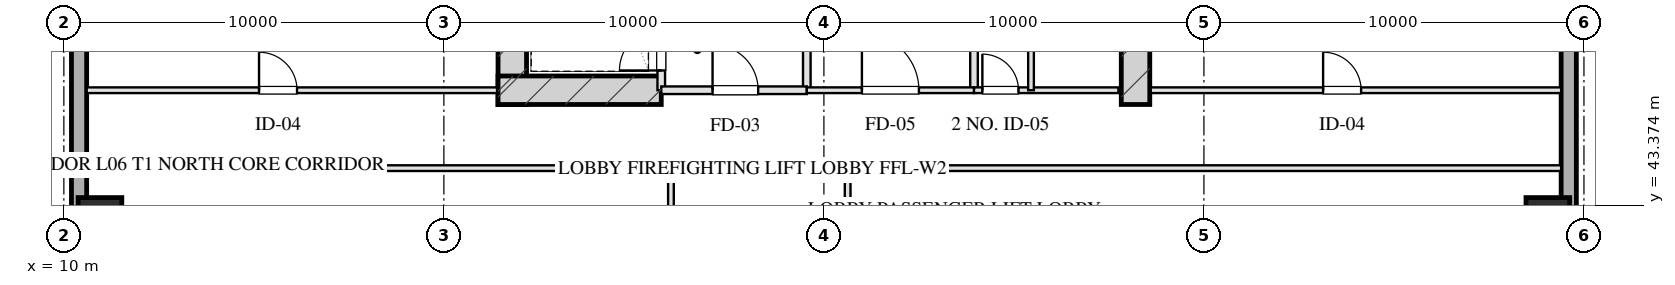
"""IFC4 building model, lengths in metres.
Left out: names, types, materials, properties, quantities, classifications, styles, units other than length and angle.
Written with IfcOpenShell. Run it as: python <this file> out.ifc"""

import sys

from ifc_helpers import new_model, si_unit, direction, frame, frame_2d, origin, origin_2d, place, context, subcontext, project, spatial, rectangle, hollow_rectangle, extrude, element, fill, save


model = new_model("IFC4")
c1 = context("Model", 3, precision=1e-05, world=origin(), true_north=direction((0.0, 1.0)))
c2 = subcontext(c1, "Body", "Model", "MODEL_VIEW")
j1 = project(units=[si_unit("LENGTHUNIT", "METRE"), si_unit("PLANEANGLEUNIT", "RADIAN")], contexts=[c1])
p1 = place(None, origin())
s1 = spatial("IfcSite", under=j1, at=p1, CompositionType="ELEMENT")
p2 = place(p1, origin())
s2 = spatial("IfcBuilding", under=s1, at=p2, CompositionType="ELEMENT")
p3 = place(p2, frame((0.0, 0.0, 30.0)))
s3 = spatial("IfcBuildingStorey", under=s2, at=p3, CompositionType="ELEMENT", Elevation=30.0)
for number, where, z_axis, x_axis in (
    (1, (21.8, 46.025, 0.0), (0.0, 0.0, 1.0), (0.0, 1.0, 0.0)),
    (2, (38.2, 46.025, 0.0), (0.0, 0.0, 1.0), (0.0, 1.0, 0.0)),
):
    element("IfcWall", number, at=place(p3, frame(where, z_axis=z_axis, x_axis=x_axis)), inside=s3, PredefinedType="SHEAR", context=c2, shape_type="SweptSolid", body=[
        extrude(rectangle(XDim=9.63, YDim=0.75, at=frame_2d((4.815, 0.0))), origin(), (0.0, 0.0, 1.0), 4.0),
    ])
p4 = place(p3, frame((21.425, 46.4, 0.0), z_axis=(0.0, 0.0, 1.0), x_axis=(1.0, 0.0, 0.0)))
e3 = element("IfcWall", 3, at=p4, inside=s3, PredefinedType="SHEAR", context=c2, shape_type="SweptSolid", body=[
    extrude(rectangle(XDim=4.295, YDim=0.75, at=frame_2d((2.147, 0.0))), origin(), (0.0, 0.0, 1.0), 4.0),
])
for number, where, z_axis, x_axis in (
    (4, (10.95, 43.0, 0.0), (0.0, 0.0, 1.0), (1.0, 0.0, 0.0)),
    (5, (49.05, 43.0, 0.0), (0.0, 0.0, 1.0), (1.0, 0.0, 0.0)),
):
    element("IfcColumn", number, at=place(p3, frame(where, z_axis=z_axis, x_axis=x_axis)), inside=s3, PredefinedType="COLUMN", context=c2, shape_type="SweptSolid", body=[
        extrude(hollow_rectangle(XDim=1.15, YDim=1.15, WallThickness=0.04, at=origin_2d()), origin(), (0.0, 0.0, 1.0), 4.001),
    ])
p5 = place(p3, frame((10.4, 7.2, 0.0), z_axis=(0.0, 0.0, 1.0), x_axis=(0.0, 1.0, 0.0)))
e6 = element("IfcWall", 6, at=p5, inside=s3, PredefinedType="SOLIDWALL", context=c2, shape_type="SweptSolid", body=[
    extrude(rectangle(XDim=53.6, YDim=0.4, at=frame_2d((26.8, 0.0))), origin(), (0.0, 0.0, 1.0), 3.16),
])
p6 = place(p5, frame((22.95, 0.0, 0.75)))
e7 = element("IfcOpeningElement", 7, at=p6, cuts=e6, PredefinedType="OPENING", context=c2, shape_type="SweptSolid", body=[
    extrude(rectangle(XDim=2.5, YDim=1.75, at=frame_2d((1.25, 0.875))), frame((0.0, 0.21, 0.0), z_axis=(0.0, -1.0, 0.0), x_axis=(1.0, 0.0, 0.0)), (0.0, 0.0, 1.0), 0.42),
])
p7 = place(p5, frame((28.15, 0.0, 0.75)))
e8 = element("IfcOpeningElement", 8, at=p7, cuts=e6, PredefinedType="OPENING", context=c2, shape_type="SweptSolid", body=[
    extrude(rectangle(XDim=2.5, YDim=1.75, at=frame_2d((1.25, 0.875))), frame((0.0, 0.21, 0.0), z_axis=(0.0, -1.0, 0.0), x_axis=(1.0, 0.0, 0.0)), (0.0, 0.0, 1.0), 0.42),
])
p8 = place(p3, frame((49.6, 60.8, 0.0), z_axis=(0.0, 0.0, 1.0), x_axis=(0.0, -1.0, 0.0)))
e9 = element("IfcWall", 9, at=p8, inside=s3, PredefinedType="SOLIDWALL", context=c2, shape_type="SweptSolid", body=[
    extrude(rectangle(XDim=53.6, YDim=0.4, at=frame_2d((26.8, 0.0))), origin(), (0.0, 0.0, 1.0), 3.16),
])
p9 = place(p8, frame((28.15, 0.0, 0.75)))
e10 = element("IfcOpeningElement", 10, at=p9, cuts=e9, PredefinedType="OPENING", context=c2, shape_type="SweptSolid", body=[
    extrude(rectangle(XDim=2.5, YDim=1.75, at=frame_2d((1.25, 0.875))), frame((0.0, 0.21, 0.0), z_axis=(0.0, -1.0, 0.0), x_axis=(1.0, 0.0, 0.0)), (0.0, 0.0, 1.0), 0.42),
])
p10 = place(p8, frame((22.95, 0.0, 0.75)))
e11 = element("IfcOpeningElement", 11, at=p10, cuts=e9, PredefinedType="OPENING", context=c2, shape_type="SweptSolid", body=[
    extrude(rectangle(XDim=2.5, YDim=1.75, at=frame_2d((1.25, 0.875))), frame((0.0, 0.21, 0.0), z_axis=(0.0, -1.0, 0.0), x_axis=(1.0, 0.0, 0.0)), (0.0, 0.0, 1.0), 0.42),
])
p11 = place(p3, frame((25.72, 46.4, 0.0), z_axis=(0.0, 0.0, 1.0), x_axis=(0.0, 1.0, 0.0)))
e12 = element("IfcWall", 12, at=p11, inside=s3, PredefinedType="PARTITIONING", context=c2, shape_type="SweptSolid", body=[
    extrude(rectangle(XDim=1.9, YDim=0.2, at=frame_2d((0.95, 0.0))), origin(), (0.0, 0.0, 1.0), 3.725),
])
p12 = place(p11, frame((0.52, 0.0, 0.0)))
e13 = element("IfcOpeningElement", 13, at=p12, cuts=e12, PredefinedType="OPENING", context=c2, shape_type="SweptSolid", body=[
    extrude(rectangle(XDim=1.1, YDim=2.05, at=frame_2d((0.55, 1.025))), frame((0.0, 0.11, 0.0), z_axis=(0.0, -1.0, 0.0), x_axis=(1.0, 0.0, 0.0)), (0.0, 0.0, 1.0), 0.22),
])
p13 = place(p3, frame((29.55, 46.4, 0.0), z_axis=(0.0, 0.0, 1.0), x_axis=(0.0, 1.0, 0.0)))
e14 = element("IfcWall", 14, at=p13, inside=s3, PredefinedType="PARTITIONING", context=c2, shape_type="SweptSolid", body=[
    extrude(rectangle(XDim=8.43, YDim=0.2, at=frame_2d((4.215, 0.0))), origin(), (0.0, 0.0, 1.0), 3.725),
])
p14 = place(p3, frame((25.72, 46.4, 0.0), z_axis=(0.0, 0.0, 1.0), x_axis=(1.0, 0.0, 0.0)))
e15 = element("IfcWall", 15, at=p14, inside=s3, PredefinedType="PARTITIONING", context=c2, shape_type="SweptSolid", body=[
    extrude(rectangle(XDim=3.83, YDim=0.2, at=frame_2d((1.915, 0.0))), origin(), (0.0, 0.0, 1.0), 3.725),
])
p15 = place(p14, frame((1.35, 0.0, 0.0)))
e16 = element("IfcOpeningElement", 16, at=p15, cuts=e15, PredefinedType="OPENING", context=c2, shape_type="SweptSolid", body=[
    extrude(rectangle(XDim=1.2, YDim=2.05, at=frame_2d((0.6, 1.025))), frame((0.0, 0.11, 0.0), z_axis=(0.0, -1.0, 0.0), x_axis=(1.0, 0.0, 0.0)), (0.0, 0.0, 1.0), 0.22),
])
p16 = place(p3, frame((33.95, 46.4, 0.0), z_axis=(0.0, 0.0, 1.0), x_axis=(0.0, 1.0, 0.0)))
e17 = element("IfcWall", 17, at=p16, inside=s3, PredefinedType="PARTITIONING", context=c2, shape_type="SweptSolid", body=[
    extrude(rectangle(XDim=8.43, YDim=0.2, at=frame_2d((4.215, 0.0))), origin(), (0.0, 0.0, 1.0), 3.725),
])
p17 = place(p3, frame((29.55, 46.4, 0.0), z_axis=(0.0, 0.0, 1.0), x_axis=(1.0, 0.0, 0.0)))
e18 = element("IfcWall", 18, at=p17, inside=s3, PredefinedType="PARTITIONING", context=c2, shape_type="SweptSolid", body=[
    extrude(rectangle(XDim=4.4, YDim=0.15, at=frame_2d((2.2, 0.0))), origin(), (0.0, 0.0, 1.0), 3.725),
])
p18 = place(p17, frame((1.45, 0.0, 0.0)))
e19 = element("IfcOpeningElement", 19, at=p18, cuts=e18, PredefinedType="OPENING", context=c2, shape_type="SweptSolid", body=[
    extrude(rectangle(XDim=1.5, YDim=2.05, at=frame_2d((0.75, 1.025))), frame((0.0, 0.085, 0.0), z_axis=(0.0, -1.0, 0.0), x_axis=(1.0, 0.0, 0.0)), (0.0, 0.0, 1.0), 0.17),
])
p19 = place(p3, frame((33.95, 46.4, 0.0), z_axis=(0.0, 0.0, 1.0), x_axis=(1.0, 0.0, 0.0)))
e20 = element("IfcWall", 20, at=p19, inside=s3, PredefinedType="PARTITIONING", context=c2, shape_type="SweptSolid", body=[
    extrude(rectangle(XDim=3.8, YDim=0.15, at=frame_2d((1.9, 0.0))), origin(), (0.0, 0.0, 1.0), 3.725),
])
p20 = place(p19, frame((0.22, 0.0, 0.0)))
e21 = element("IfcOpeningElement", 21, at=p20, cuts=e20, PredefinedType="OPENING", context=c2, shape_type="SweptSolid", body=[
    extrude(rectangle(XDim=0.95, YDim=2.05, at=frame_2d((0.475, 1.025))), frame((0.0, 0.085, 0.0), z_axis=(0.0, -1.0, 0.0), x_axis=(1.0, 0.0, 0.0)), (0.0, 0.0, 1.0), 0.17),
])
p21 = place(p3, frame((35.45, 46.4, 0.0), z_axis=(0.0, 0.0, 1.0), x_axis=(0.0, 1.0, 0.0)))
e22 = element("IfcWall", 22, at=p21, inside=s3, PredefinedType="PARTITIONING", context=c2, shape_type="SweptSolid", body=[
    extrude(rectangle(XDim=8.43, YDim=0.15, at=frame_2d((4.215, 0.0))), origin(), (0.0, 0.0, 1.0), 3.315),
])
p22 = place(p21, frame((2.55, 0.0, 0.0)))
e23 = element("IfcOpeningElement", 23, at=p22, cuts=e22, PredefinedType="OPENING", context=c2, shape_type="SweptSolid", body=[
    extrude(rectangle(XDim=0.95, YDim=2.05, at=frame_2d((0.475, 1.025))), frame((0.0, 0.085, 0.0), z_axis=(0.0, -1.0, 0.0), x_axis=(1.0, 0.0, 0.0)), (0.0, 0.0, 1.0), 0.17),
])
p23 = place(p21, frame((4.7, 0.0, 0.0)))
e24 = element("IfcOpeningElement", 24, at=p23, cuts=e22, PredefinedType="OPENING", context=c2, shape_type="SweptSolid", body=[
    extrude(rectangle(XDim=0.9, YDim=2.05, at=frame_2d((0.45, 1.025))), frame((0.0, 0.085, 0.0), z_axis=(0.0, -1.0, 0.0), x_axis=(1.0, 0.0, 0.0)), (0.0, 0.0, 1.0), 0.17),
])
p24 = place(p21, frame((6.8, 0.0, 0.0)))
e25 = element("IfcOpeningElement", 25, at=p24, cuts=e22, PredefinedType="OPENING", context=c2, shape_type="SweptSolid", body=[
    extrude(rectangle(XDim=0.9, YDim=2.05, at=frame_2d((0.45, 1.025))), frame((0.0, 0.085, 0.0), z_axis=(0.0, -1.0, 0.0), x_axis=(1.0, 0.0, 0.0)), (0.0, 0.0, 1.0), 0.17),
])
p25 = place(p3, frame((10.6, 46.4, 0.0), z_axis=(0.0, 0.0, 1.0), x_axis=(1.0, 0.0, 0.0)))
e26 = element("IfcWall", 26, at=p25, inside=s3, PredefinedType="PARTITIONING", context=c2, shape_type="SweptSolid", body=[
    extrude(rectangle(XDim=10.8, YDim=0.15, at=frame_2d((5.4, 0.0))), origin(), (0.0, 0.0, 1.0), 3.725),
])
p26 = place(p25, frame((4.536, 0.0, 0.0)))
e27 = element("IfcOpeningElement", 27, at=p26, cuts=e26, PredefinedType="OPENING", context=c2, shape_type="SweptSolid", body=[
    extrude(rectangle(XDim=1.0, YDim=2.05, at=frame_2d((0.5, 1.025))), frame((0.0, 0.085, 0.0), z_axis=(0.0, -1.0, 0.0), x_axis=(1.0, 0.0, 0.0)), (0.0, 0.0, 1.0), 0.17),
])
p27 = place(p3, frame((38.6, 46.4, 0.0), z_axis=(0.0, 0.0, 1.0), x_axis=(1.0, 0.0, 0.0)))
e28 = element("IfcWall", 28, at=p27, inside=s3, PredefinedType="PARTITIONING", context=c2, shape_type="SweptSolid", body=[
    extrude(rectangle(XDim=10.8, YDim=0.15, at=frame_2d((5.4, 0.0))), origin(), (0.0, 0.0, 1.0), 3.725),
])
p28 = place(p27, frame((4.536, 0.0, 0.0)))
e29 = element("IfcOpeningElement", 29, at=p28, cuts=e28, PredefinedType="OPENING", context=c2, shape_type="SweptSolid", body=[
    extrude(rectangle(XDim=1.0, YDim=2.05, at=frame_2d((0.5, 1.025))), frame((0.0, 0.085, 0.0), z_axis=(0.0, -1.0, 0.0), x_axis=(1.0, 0.0, 0.0)), (0.0, 0.0, 1.0), 0.17),
])
p29 = place(p3, frame((10.6, 44.35, 0.0), z_axis=(0.0, 0.0, 1.0), x_axis=(1.0, 0.0, 0.0)))
e30 = element("IfcWall", 30, at=p29, inside=s3, PredefinedType="PARTITIONING", context=c2, shape_type="SweptSolid", body=[
    extrude(rectangle(XDim=15.375, YDim=0.15, at=frame_2d((7.688, 0.0))), origin(), (0.0, 0.0, 1.0), 3.725),
])
p30 = place(p3, frame((30.625, 44.35, 0.0), z_axis=(0.0, 0.0, 1.0), x_axis=(1.0, 0.0, 0.0)))
e31 = element("IfcWall", 31, at=p30, inside=s3, PredefinedType="PARTITIONING", context=c2, shape_type="SweptSolid", body=[
    extrude(rectangle(XDim=18.775, YDim=0.15, at=frame_2d((9.387, 0.0))), origin(), (0.0, 0.0, 1.0), 3.725),
])
p31 = place(p3, frame((25.975, 23.65, 0.0), z_axis=(0.0, 0.0, 1.0), x_axis=(0.0, 1.0, 0.0)))
e32 = element("IfcWall", 32, at=p31, inside=s3, PredefinedType="PARTITIONING", context=c2, shape_type="SweptSolid", body=[
    extrude(rectangle(XDim=20.7, YDim=0.15, at=frame_2d((10.35, 0.0))), origin(), (0.0, 0.0, 1.0), 3.725),
])
p32 = place(p31, frame((2.175, 0.0, 0.0)))
e33 = element("IfcOpeningElement", 33, at=p32, cuts=e32, PredefinedType="OPENING", context=c2, shape_type="SweptSolid", body=[
    extrude(rectangle(XDim=1.05, YDim=2.05, at=frame_2d((0.525, 1.025))), frame((0.0, 0.085, 0.0), z_axis=(0.0, -1.0, 0.0), x_axis=(1.0, 0.0, 0.0)), (0.0, 0.0, 1.0), 0.17),
])
p33 = place(p31, frame((7.69, 0.0, 0.0)))
e34 = element("IfcOpeningElement", 34, at=p33, cuts=e32, PredefinedType="OPENING", context=c2, shape_type="SweptSolid", body=[
    extrude(rectangle(XDim=1.0, YDim=2.05, at=frame_2d((0.5, 1.025))), frame((0.0, 0.085, 0.0), z_axis=(0.0, -1.0, 0.0), x_axis=(1.0, 0.0, 0.0)), (0.0, 0.0, 1.0), 0.17),
])
p34 = place(p31, frame((12.69, 0.0, 0.0)))
e35 = element("IfcOpeningElement", 35, at=p34, cuts=e32, PredefinedType="OPENING", context=c2, shape_type="SweptSolid", body=[
    extrude(rectangle(XDim=1.0, YDim=2.05, at=frame_2d((0.5, 1.025))), frame((0.0, 0.085, 0.0), z_axis=(0.0, -1.0, 0.0), x_axis=(1.0, 0.0, 0.0)), (0.0, 0.0, 1.0), 0.17),
])
p35 = place(p31, frame((17.525, 0.0, 0.0)))
e36 = element("IfcOpeningElement", 36, at=p35, cuts=e32, PredefinedType="OPENING", context=c2, shape_type="SweptSolid", body=[
    extrude(rectangle(XDim=0.85, YDim=2.05, at=frame_2d((0.425, 1.025))), frame((0.0, 0.085, 0.0), z_axis=(0.0, -1.0, 0.0), x_axis=(1.0, 0.0, 0.0)), (0.0, 0.0, 1.0), 0.17),
])
p36 = place(p3, frame((30.625, 23.65, 0.0), z_axis=(0.0, 0.0, 1.0), x_axis=(0.0, 1.0, 0.0)))
e37 = element("IfcWall", 37, at=p36, inside=s3, PredefinedType="PARTITIONING", context=c2, shape_type="SweptSolid", body=[
    extrude(rectangle(XDim=20.7, YDim=0.15, at=frame_2d((10.35, 0.0))), origin(), (0.0, 0.0, 1.0), 3.725),
])
p37 = place(p36, frame((2.191, 0.0, 0.0)))
e38 = element("IfcOpeningElement", 38, at=p37, cuts=e37, PredefinedType="OPENING", context=c2, shape_type="SweptSolid", body=[
    extrude(rectangle(XDim=1.0, YDim=2.05, at=frame_2d((0.5, 1.025))), frame((0.0, 0.085, 0.0), z_axis=(0.0, -1.0, 0.0), x_axis=(1.0, 0.0, 0.0)), (0.0, 0.0, 1.0), 0.17),
])
p38 = place(p36, frame((7.78, 0.0, 0.0)))
e39 = element("IfcOpeningElement", 39, at=p38, cuts=e37, PredefinedType="OPENING", context=c2, shape_type="SweptSolid", body=[
    extrude(rectangle(XDim=1.0, YDim=2.05, at=frame_2d((0.5, 1.025))), frame((0.0, 0.085, 0.0), z_axis=(0.0, -1.0, 0.0), x_axis=(1.0, 0.0, 0.0)), (0.0, 0.0, 1.0), 0.17),
])
p39 = place(p36, frame((12.764, 0.0, 0.0)))
e40 = element("IfcOpeningElement", 40, at=p39, cuts=e37, PredefinedType="OPENING", context=c2, shape_type="SweptSolid", body=[
    extrude(rectangle(XDim=1.0, YDim=2.05, at=frame_2d((0.5, 1.025))), frame((0.0, 0.085, 0.0), z_axis=(0.0, -1.0, 0.0), x_axis=(1.0, 0.0, 0.0)), (0.0, 0.0, 1.0), 0.17),
])
p40 = place(p36, frame((17.525, 0.0, 0.0)))
e41 = element("IfcOpeningElement", 41, at=p40, cuts=e37, PredefinedType="OPENING", context=c2, shape_type="SweptSolid", body=[
    extrude(rectangle(XDim=1.05, YDim=2.05, at=frame_2d((0.525, 1.025))), frame((0.0, 0.085, 0.0), z_axis=(0.0, -1.0, 0.0), x_axis=(1.0, 0.0, 0.0)), (0.0, 0.0, 1.0), 0.17),
])
p41 = place(p12, origin())
e42 = element("IfcDoor", 42, at=p41, inside=s3, OperationType="SINGLE_SWING_LEFT", PredefinedType="DOOR", context=c2, shape_type="SweptSolid", body=[
    extrude(rectangle(XDim=1.1, YDim=2.05, at=frame_2d((0.55, 1.025))), frame((0.0, 0.025, 0.0), z_axis=(0.0, -1.0, 0.0), x_axis=(1.0, 0.0, 0.0)), (0.0, 0.0, 1.0), 0.05),
])
fill(e13, e42)
p42 = place(p15, origin())
e43 = element("IfcDoor", 43, at=p42, inside=s3, OperationType="SINGLE_SWING_LEFT", PredefinedType="DOOR", context=c2, shape_type="SweptSolid", body=[
    extrude(rectangle(XDim=1.2, YDim=2.05, at=frame_2d((0.6, 1.025))), frame((0.0, 0.025, 0.0), z_axis=(0.0, -1.0, 0.0), x_axis=(1.0, 0.0, 0.0)), (0.0, 0.0, 1.0), 0.05),
])
fill(e16, e43)
p43 = place(p18, origin())
e44 = element("IfcDoor", 44, at=p43, inside=s3, OperationType="SINGLE_SWING_LEFT", PredefinedType="DOOR", context=c2, shape_type="SweptSolid", body=[
    extrude(rectangle(XDim=1.5, YDim=2.05, at=frame_2d((0.75, 1.025))), frame((0.0, 0.025, 0.0), z_axis=(0.0, -1.0, 0.0), x_axis=(1.0, 0.0, 0.0)), (0.0, 0.0, 1.0), 0.05),
])
fill(e19, e44)
p44 = place(p20, origin())
e45 = element("IfcDoor", 45, at=p44, inside=s3, OperationType="SINGLE_SWING_LEFT", PredefinedType="DOOR", context=c2, shape_type="SweptSolid", body=[
    extrude(rectangle(XDim=0.95, YDim=2.05, at=frame_2d((0.475, 1.025))), frame((0.0, 0.025, 0.0), z_axis=(0.0, -1.0, 0.0), x_axis=(1.0, 0.0, 0.0)), (0.0, 0.0, 1.0), 0.05),
])
fill(e21, e45)
p45 = place(p26, origin())
e46 = element("IfcDoor", 46, at=p45, inside=s3, OperationType="SINGLE_SWING_LEFT", PredefinedType="DOOR", context=c2, shape_type="SweptSolid", body=[
    extrude(rectangle(XDim=1.0, YDim=2.05, at=frame_2d((0.5, 1.025))), frame((0.0, 0.025, 0.0), z_axis=(0.0, -1.0, 0.0), x_axis=(1.0, 0.0, 0.0)), (0.0, 0.0, 1.0), 0.05),
])
fill(e27, e46)
p46 = place(p28, origin())
e47 = element("IfcDoor", 47, at=p46, inside=s3, OperationType="SINGLE_SWING_LEFT", PredefinedType="DOOR", context=c2, shape_type="SweptSolid", body=[
    extrude(rectangle(XDim=1.0, YDim=2.05, at=frame_2d((0.5, 1.025))), frame((0.0, 0.025, 0.0), z_axis=(0.0, -1.0, 0.0), x_axis=(1.0, 0.0, 0.0)), (0.0, 0.0, 1.0), 0.05),
])
fill(e29, e47)
save(model, sys.argv[1])
